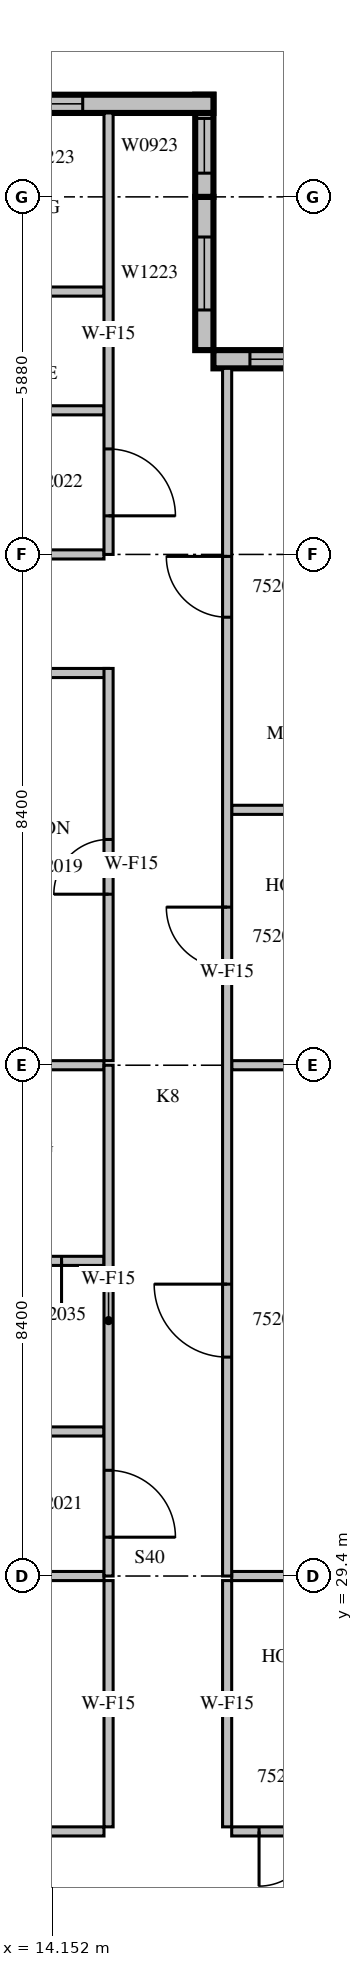
"""IFC4 building model, lengths in metres.
Left out: names, types, materials, properties, quantities, classifications, styles, units other than length and angle.
Written with IfcOpenShell. Run it as: python <this file> out.ifc"""

import sys

from ifc_helpers import new_model, si_unit, direction, frame, frame_2d, origin, place, context, subcontext, project, spatial, rectangle, extrude, source, transform, mapped, element, fill, save


model = new_model("IFC4")
c1 = context("Model", 3, precision=1e-05, world=origin(), true_north=direction((0.0, 1.0)))
c2 = subcontext(c1, "Body", "Model", "MODEL_VIEW")
j1 = project(units=[si_unit("LENGTHUNIT", "METRE"), si_unit("PLANEANGLEUNIT", "RADIAN")], contexts=[c1])
p1 = place(None, origin())
s1 = spatial("IfcSite", under=j1, at=p1, CompositionType="ELEMENT")
p2 = place(p1, origin())
s2 = spatial("IfcBuilding", under=s1, at=p2, CompositionType="ELEMENT")
p3 = place(p2, frame((0.0, 0.0, 231.0)))
s3 = spatial("IfcBuildingStorey", under=s2, at=p3, CompositionType="ELEMENT", Elevation=231.0)
m1 = source(origin(), c2, "Body", "SweptSolid", [
    extrude(rectangle(XDim=4.2, YDim=0.3, at=frame_2d((2.1, 0.0))), origin(), (0.0, 0.0, 1.0), 3.4),
])
p4 = place(p3, frame((21.0, 49.41, 0.0), z_axis=(0.0, 0.0, 1.0), x_axis=(-1.0, 0.0, 0.0)))
e1 = element("IfcWall", 1, at=p4, inside=s3, PredefinedType="STANDARD", context=c2, shape_type="MappedRepresentation", body=[
    mapped(m1, transform((0.0, 0.0, 0.0), scale=1.0)),
])
m2 = source(origin(), c2, "Body", "SweptSolid", [
    extrude(rectangle(XDim=3.0, YDim=2.3, at=frame_2d((1.5, 1.15))), frame((0.0, 0.16, 0.0), z_axis=(0.0, -1.0, 0.0), x_axis=(1.0, 0.0, 0.0)), (0.0, 0.0, 1.0), 0.32),
])
p5 = place(p4, frame((0.6, 0.0, 0.6)))
e2 = element("IfcOpeningElement", 2, at=p5, cuts=e1, PredefinedType="OPENING", context=c2, shape_type="MappedRepresentation", body=[
    mapped(m2, transform((0.0, 0.0, 0.0), scale=1.0)),
])
m3 = source(origin(), c2, "Body", "SweptSolid", [
    extrude(rectangle(XDim=2.52, YDim=0.3, at=frame_2d((1.26, 0.0))), origin(), (0.0, 0.0, 1.0), 3.4),
])
p6 = place(p3, frame((16.65, 49.56, 0.0), z_axis=(0.0, 0.0, 1.0), x_axis=(0.0, 1.0, 0.0)))
e3 = element("IfcWall", 3, at=p6, inside=s3, PredefinedType="STANDARD", context=c2, shape_type="MappedRepresentation", body=[
    mapped(m3, transform((0.0, 0.0, 0.0), scale=1.0)),
])
m4 = source(origin(), c2, "Body", "SweptSolid", [
    extrude(rectangle(XDim=1.2, YDim=2.3, at=frame_2d((0.6, 1.15))), frame((0.0, 0.16, 0.0), z_axis=(0.0, -1.0, 0.0), x_axis=(1.0, 0.0, 0.0)), (0.0, 0.0, 1.0), 0.32),
])
p7 = place(p6, frame((0.66, 0.0, 0.6)))
e4 = element("IfcOpeningElement", 4, at=p7, cuts=e3, PredefinedType="OPENING", context=c2, shape_type="MappedRepresentation", body=[
    mapped(m4, transform((0.0, 0.0, 0.0), scale=1.0)),
])
m5 = source(origin(), c2, "Body", "SweptSolid", [
    extrude(rectangle(XDim=1.68, YDim=0.3, at=frame_2d((0.84, 0.0))), origin(), (0.0, 0.0, 1.0), 3.4),
])
p8 = place(p3, frame((16.65, 52.08, 0.0), z_axis=(0.0, 0.0, 1.0), x_axis=(0.0, 1.0, 0.0)))
e5 = element("IfcWall", 5, at=p8, inside=s3, PredefinedType="STANDARD", context=c2, shape_type="MappedRepresentation", body=[
    mapped(m5, transform((0.0, 0.0, 0.0), scale=1.0)),
])
m6 = source(origin(), c2, "Body", "SweptSolid", [
    extrude(rectangle(XDim=0.9, YDim=2.3, at=frame_2d((0.45, 1.15))), frame((0.0, 0.16, 0.0), z_axis=(0.0, -1.0, 0.0), x_axis=(1.0, 0.0, 0.0)), (0.0, 0.0, 1.0), 0.32),
])
p9 = place(p8, frame((0.39, 0.0, 0.6)))
e6 = element("IfcOpeningElement", 6, at=p9, cuts=e5, PredefinedType="OPENING", context=c2, shape_type="MappedRepresentation", body=[
    mapped(m6, transform((0.0, 0.0, 0.0), scale=1.0)),
])
m7 = source(origin(), c2, "Body", "SweptSolid", [
    extrude(rectangle(XDim=10.5, YDim=0.3, at=frame_2d((5.25, 0.0))), origin(), (0.0, 0.0, 1.0), 3.4),
])
p10 = place(p3, frame((16.8, 53.61, 0.0), z_axis=(0.0, 0.0, 1.0), x_axis=(-1.0, 0.0, 0.0)))
e7 = element("IfcWall", 7, at=p10, inside=s3, PredefinedType="STANDARD", context=c2, shape_type="MappedRepresentation", body=[
    mapped(m7, transform((0.0, 0.0, 0.0), scale=1.0)),
])
p11 = place(p10, frame((2.15, 0.0, 0.6)))
e8 = element("IfcOpeningElement", 8, at=p11, cuts=e7, PredefinedType="OPENING", context=c2, shape_type="MappedRepresentation", body=[
    mapped(m4, transform((0.0, 0.0, 0.0), scale=1.0)),
])
m8 = source(origin(), c2, "Body", "SweptSolid", [
    extrude(rectangle(XDim=1.8, YDim=2.3, at=frame_2d((0.9, 1.15))), frame((0.0, 0.16, 0.0), z_axis=(0.0, -1.0, 0.0), x_axis=(1.0, 0.0, 0.0)), (0.0, 0.0, 1.0), 0.32),
])
p12 = place(p10, frame((8.025, 0.0, 0.6)))
e9 = element("IfcOpeningElement", 9, at=p12, cuts=e7, PredefinedType="OPENING", context=c2, shape_type="MappedRepresentation", body=[
    mapped(m8, transform((0.0, 0.0, 0.0), scale=1.0)),
])
m9 = source(origin(), c2, "Body", "SweptSolid", [
    extrude(rectangle(XDim=4.295, YDim=0.15, at=frame_2d((2.147, 0.0))), origin(), (0.0, 0.0, 1.0), 3.4),
])
p13 = place(p3, frame((10.705, 25.2, 0.0), z_axis=(0.0, 0.0, 1.0), x_axis=(1.0, 0.0, 0.0)))
e10 = element("IfcWall", 10, at=p13, inside=s3, PredefinedType="PARTITIONING", context=c2, shape_type="MappedRepresentation", body=[
    mapped(m9, transform((0.0, 0.0, 0.0), scale=1.0)),
])
m10 = source(origin(), c2, "Body", "SweptSolid", [
    extrude(rectangle(XDim=0.9, YDim=2.1, at=frame_2d((0.45, 1.05))), frame((0.0, 0.085, 0.0), z_axis=(0.0, -1.0, 0.0), x_axis=(1.0, 0.0, 0.0)), (0.0, 0.0, 1.0), 0.17),
])
p14 = place(p13, frame((2.283, 0.0, 0.0)))
e11 = element("IfcOpeningElement", 11, at=p14, cuts=e10, PredefinedType="OPENING", context=c2, shape_type="MappedRepresentation", body=[
    mapped(m10, transform((0.0, 0.0, 0.0), scale=1.0)),
])
m11 = source(origin(), c2, "Body", "SweptSolid", [
    extrude(rectangle(XDim=3.6, YDim=0.15, at=frame_2d((1.8, 0.0))), origin(), (0.0, 0.0, 1.0), 3.4),
])
p15 = place(p3, frame((17.1, 25.2, 0.0), z_axis=(0.0, 0.0, 1.0), x_axis=(1.0, 0.0, 0.0)))
e12 = element("IfcWall", 12, at=p15, inside=s3, PredefinedType="PARTITIONING", context=c2, shape_type="MappedRepresentation", body=[
    mapped(m11, transform((0.0, 0.0, 0.0), scale=1.0)),
])
p16 = place(p15, frame((0.45, 0.0, 0.0)))
e13 = element("IfcOpeningElement", 13, at=p16, cuts=e12, PredefinedType="OPENING", context=c2, shape_type="MappedRepresentation", body=[
    mapped(m10, transform((0.0, 0.0, 0.0), scale=1.0)),
])
m12 = source(origin(), c2, "Body", "SweptSolid", [
    extrude(rectangle(XDim=4.05, YDim=0.15, at=frame_2d((2.025, 0.0))), origin(), (0.0, 0.0, 1.0), 3.4),
])
for number, where, z_axis, x_axis in (
    (14, (15.075, 25.275, 0.0), (0.0, 0.0, 1.0), (0.0, 1.0, 0.0)),
    (15, (17.025, 29.325, 0.0), (0.0, 0.0, 1.0), (0.0, -1.0, 0.0)),
):
    element("IfcWall", number, at=place(p3, frame(where, z_axis=z_axis, x_axis=x_axis)), inside=s3, PredefinedType="PARTITIONING", context=c2, shape_type="MappedRepresentation", body=[
        mapped(m12, transform((0.0, 0.0, 0.0), scale=1.0)),
    ])
m13 = source(origin(), c2, "Body", "SweptSolid", [
    extrude(rectangle(XDim=4.101, YDim=0.15, at=frame_2d((2.05, 0.0))), origin(), (0.0, 0.0, 1.0), 3.4),
])
p17 = place(p3, frame((15.0, 29.4, 0.0), z_axis=(0.0, 0.0, 1.0), x_axis=(-1.0, 0.0, 0.0)))
e16 = element("IfcWall", 16, at=p17, inside=s3, PredefinedType="PARTITIONING", context=c2, shape_type="MappedRepresentation", body=[
    mapped(m13, transform((0.0, 0.0, 0.0), scale=1.0)),
])
m14 = source(origin(), c2, "Body", "SweptSolid", [
    extrude(rectangle(XDim=3.101, YDim=0.15, at=frame_2d((1.55, 0.0))), origin(), (0.0, 0.0, 1.0), 3.4),
])
p18 = place(p3, frame((20.201, 29.4, 0.0), z_axis=(0.0, 0.0, 1.0), x_axis=(-1.0, 0.0, 0.0)))
e17 = element("IfcWall", 17, at=p18, inside=s3, PredefinedType="PARTITIONING", context=c2, shape_type="MappedRepresentation", body=[
    mapped(m14, transform((0.0, 0.0, 0.0), scale=1.0)),
])
m15 = source(origin(), c2, "Body", "SweptSolid", [
    extrude(rectangle(XDim=3.975, YDim=0.15, at=frame_2d((1.988, 0.0))), origin(), (0.0, 0.0, 1.0), 3.4),
])
p19 = place(p3, frame((15.075, 44.25, 0.0), z_axis=(0.0, 0.0, 1.0), x_axis=(-1.0, 0.0, 0.0)))
e18 = element("IfcWall", 18, at=p19, inside=s3, PredefinedType="PARTITIONING", context=c2, shape_type="MappedRepresentation", body=[
    mapped(m15, transform((0.0, 0.0, 0.0), scale=1.0)),
])
m16 = source(origin(), c2, "Body", "SweptSolid", [
    extrude(rectangle(XDim=6.45, YDim=0.15, at=frame_2d((3.225, 0.0))), origin(), (0.0, 0.0, 1.0), 3.4),
])
p20 = place(p3, frame((15.075, 37.875, 0.0), z_axis=(0.0, 0.0, 1.0), x_axis=(0.0, 1.0, 0.0)))
e19 = element("IfcWall", 19, at=p20, inside=s3, PredefinedType="PARTITIONING", context=c2, shape_type="MappedRepresentation", body=[
    mapped(m16, transform((0.0, 0.0, 0.0), scale=1.0)),
])
p21 = place(p20, frame((2.737, 0.0, 0.0)))
e20 = element("IfcOpeningElement", 20, at=p21, cuts=e19, PredefinedType="OPENING", context=c2, shape_type="MappedRepresentation", body=[
    mapped(m10, transform((0.0, 0.0, 0.0), scale=1.0)),
])
p22 = place(p3, frame((15.0, 31.777, 0.0), z_axis=(0.0, 0.0, 1.0), x_axis=(-1.0, 0.0, 0.0)))
e21 = element("IfcWall", 21, at=p22, inside=s3, PredefinedType="PARTITIONING", context=c2, shape_type="MappedRepresentation", body=[
    mapped(m9, transform((0.0, 0.0, 0.0), scale=1.0)),
])
p23 = place(p22, frame((1.698, 0.0, 0.0)))
e22 = element("IfcOpeningElement", 22, at=p23, cuts=e21, PredefinedType="OPENING", context=c2, shape_type="MappedRepresentation", body=[
    mapped(m10, transform((0.0, 0.0, 0.0), scale=1.0)),
])
p24 = place(p3, frame((15.0, 34.583, 0.0), z_axis=(0.0, 0.0, 1.0), x_axis=(-1.0, 0.0, 0.0)))
e23 = element("IfcWall", 23, at=p24, inside=s3, PredefinedType="PARTITIONING", context=c2, shape_type="MappedRepresentation", body=[
    mapped(m9, transform((0.0, 0.0, 0.0), scale=1.0)),
])
p25 = place(p24, frame((1.698, 0.0, 0.0)))
e24 = element("IfcOpeningElement", 24, at=p25, cuts=e23, PredefinedType="OPENING", context=c2, shape_type="MappedRepresentation", body=[
    mapped(m10, transform((0.0, 0.0, 0.0), scale=1.0)),
])
p26 = place(p24, frame((0.698, 0.0, 0.0)))
e25 = element("IfcOpeningElement", 25, at=p26, cuts=e23, PredefinedType="OPENING", context=c2, shape_type="MappedRepresentation", body=[
    mapped(m10, transform((0.0, 0.0, 0.0), scale=1.0)),
])
p27 = place(p24, frame((2.698, 0.0, 0.0)))
e26 = element("IfcOpeningElement", 26, at=p27, cuts=e23, PredefinedType="OPENING", context=c2, shape_type="MappedRepresentation", body=[
    mapped(m10, transform((0.0, 0.0, 0.0), scale=1.0)),
])
p28 = place(p3, frame((15.0, 37.8, 0.0), z_axis=(0.0, 0.0, 1.0), x_axis=(-1.0, 0.0, 0.0)))
e27 = element("IfcWall", 27, at=p28, inside=s3, PredefinedType="PARTITIONING", context=c2, shape_type="MappedRepresentation", body=[
    mapped(m13, transform((0.0, 0.0, 0.0), scale=1.0)),
])
m17 = source(origin(), c2, "Body", "SweptSolid", [
    extrude(rectangle(XDim=3.95, YDim=0.15, at=frame_2d((1.975, 0.0))), origin(), (0.0, 0.0, 1.0), 3.4),
])
for number, where, z_axis, x_axis in (
    (28, (15.0, 48.57, 0.0), (0.0, 0.0, 1.0), (-1.0, 0.0, 0.0)),
    (29, (15.0, 50.523, 0.0), (0.0, 0.0, 1.0), (-1.0, 0.0, 0.0)),
    (30, (15.0, 46.2, 0.0), (0.0, 0.0, 1.0), (-1.0, 0.0, 0.0)),
):
    element("IfcWall", number, at=place(p3, frame(where, z_axis=z_axis, x_axis=x_axis)), inside=s3, PredefinedType="PARTITIONING", context=c2, shape_type="MappedRepresentation", body=[
        mapped(m17, transform((0.0, 0.0, 0.0), scale=1.0)),
    ])
p29 = place(p3, frame((20.201, 37.8, 0.0), z_axis=(0.0, 0.0, 1.0), x_axis=(-1.0, 0.0, 0.0)))
e31 = element("IfcWall", 31, at=p29, inside=s3, PredefinedType="PARTITIONING", context=c2, shape_type="MappedRepresentation", body=[
    mapped(m14, transform((0.0, 0.0, 0.0), scale=1.0)),
])
p30 = place(p3, frame((20.7, 42.0, 0.0), z_axis=(0.0, 0.0, 1.0), x_axis=(-1.0, 0.0, 0.0)))
e32 = element("IfcWall", 32, at=p30, inside=s3, PredefinedType="PARTITIONING", context=c2, shape_type="MappedRepresentation", body=[
    mapped(m11, transform((0.0, 0.0, 0.0), scale=1.0)),
])
m18 = source(origin(), c2, "Body", "SweptSolid", [
    extrude(rectangle(XDim=8.4, YDim=0.15, at=frame_2d((4.2, 0.0))), origin(), (0.0, 0.0, 1.0), 3.4),
])
p31 = place(p3, frame((15.075, 29.4, 0.0), z_axis=(0.0, 0.0, 1.0), x_axis=(0.0, 1.0, 0.0)))
e33 = element("IfcWall", 33, at=p31, inside=s3, PredefinedType="PARTITIONING", context=c2, shape_type="MappedRepresentation", body=[
    mapped(m18, transform((0.0, 0.0, 0.0), scale=1.0)),
])
m19 = source(origin(), c2, "Body", "SweptSolid", [
    extrude(rectangle(XDim=1.1, YDim=2.1, at=frame_2d((0.55, 1.05))), frame((0.0, 0.085, 0.0), z_axis=(0.0, -1.0, 0.0), x_axis=(1.0, 0.0, 0.0)), (0.0, 0.0, 1.0), 0.17),
])
p32 = place(p31, frame((0.638, 0.0, 0.0)))
e34 = element("IfcOpeningElement", 34, at=p32, cuts=e33, PredefinedType="OPENING", context=c2, shape_type="MappedRepresentation", body=[
    mapped(m19, transform((0.0, 0.0, 0.0), scale=1.0)),
])
m20 = source(origin(), c2, "Body", "SweptSolid", [
    extrude(rectangle(XDim=7.26, YDim=0.15, at=frame_2d((3.63, 0.0))), origin(), (0.0, 0.0, 1.0), 3.4),
])
p33 = place(p3, frame((15.075, 46.2, 0.0), z_axis=(0.0, 0.0, 1.0), x_axis=(0.0, 1.0, 0.0)))
e35 = element("IfcWall", 35, at=p33, inside=s3, PredefinedType="PARTITIONING", context=c2, shape_type="MappedRepresentation", body=[
    mapped(m20, transform((0.0, 0.0, 0.0), scale=1.0)),
])
p34 = place(p33, frame((0.635, 0.0, 0.0)))
e36 = element("IfcOpeningElement", 36, at=p34, cuts=e35, PredefinedType="OPENING", context=c2, shape_type="MappedRepresentation", body=[
    mapped(m19, transform((0.0, 0.0, 0.0), scale=1.0)),
])
m21 = source(origin(), c2, "Body", "SweptSolid", [
    extrude(rectangle(XDim=19.86, YDim=0.15, at=frame_2d((9.93, 0.0))), origin(), (0.0, 0.0, 1.0), 3.4),
])
p35 = place(p3, frame((17.025, 49.26, 0.0), z_axis=(0.0, 0.0, 1.0), x_axis=(0.0, -1.0, 0.0)))
e37 = element("IfcWall", 37, at=p35, inside=s3, PredefinedType="PARTITIONING", context=c2, shape_type="MappedRepresentation", body=[
    mapped(m21, transform((0.0, 0.0, 0.0), scale=1.0)),
])
m22 = source(origin(), c2, "Body", "SweptSolid", [
    extrude(rectangle(XDim=1.2, YDim=2.1, at=frame_2d((0.6, 1.05))), frame((0.0, 0.085, 0.0), z_axis=(0.0, -1.0, 0.0), x_axis=(1.0, 0.0, 0.0)), (0.0, 0.0, 1.0), 0.17),
])
p36 = place(p35, frame((15.06, 0.0, 0.0)))
e38 = element("IfcOpeningElement", 38, at=p36, cuts=e37, PredefinedType="OPENING", context=c2, shape_type="MappedRepresentation", body=[
    mapped(m22, transform((0.0, 0.0, 0.0), scale=1.0)),
])
m23 = source(origin(), c2, "Body", "SweptSolid", [
    extrude(rectangle(XDim=1.0, YDim=2.1, at=frame_2d((0.5, 1.05))), frame((0.0, 0.085, 0.0), z_axis=(0.0, -1.0, 0.0), x_axis=(1.0, 0.0, 0.0)), (0.0, 0.0, 1.0), 0.17),
])
p37 = place(p35, frame((8.86, 0.0, 0.0)))
e39 = element("IfcOpeningElement", 39, at=p37, cuts=e37, PredefinedType="OPENING", context=c2, shape_type="MappedRepresentation", body=[
    mapped(m23, transform((0.0, 0.0, 0.0), scale=1.0)),
])
p38 = place(p35, frame((3.092, 0.0, 0.0)))
e40 = element("IfcOpeningElement", 40, at=p38, cuts=e37, PredefinedType="OPENING", context=c2, shape_type="MappedRepresentation", body=[
    mapped(m23, transform((0.0, 0.0, 0.0), scale=1.0)),
])
m24 = source(origin(), c2, "Body", "SweptSolid", [
    extrude(rectangle(XDim=3.0, YDim=2.3, at=frame_2d((1.5, 1.15))), frame((0.0, 0.03, 0.0), z_axis=(0.0, -1.0, 0.0), x_axis=(1.0, 0.0, 0.0)), (0.0, 0.0, 1.0), 0.06),
])
p39 = place(p5, origin())
e41 = element("IfcWindow", 41, at=p39, inside=s3, PartitioningType="SINGLE_PANEL", PredefinedType="WINDOW", context=c2, shape_type="MappedRepresentation", body=[
    mapped(m24, transform((0.0, 0.0, 0.0), scale=1.0)),
])
fill(e2, e41)
m25 = source(origin(), c2, "Body", "SweptSolid", [
    extrude(rectangle(XDim=1.2, YDim=2.3, at=frame_2d((0.6, 1.15))), frame((0.0, 0.03, 0.0), z_axis=(0.0, -1.0, 0.0), x_axis=(1.0, 0.0, 0.0)), (0.0, 0.0, 1.0), 0.06),
])
p40 = place(p7, origin())
e42 = element("IfcWindow", 42, at=p40, inside=s3, PartitioningType="SINGLE_PANEL", PredefinedType="WINDOW", context=c2, shape_type="MappedRepresentation", body=[
    mapped(m25, transform((0.0, 0.0, 0.0), scale=1.0)),
])
fill(e4, e42)
m26 = source(origin(), c2, "Body", "SweptSolid", [
    extrude(rectangle(XDim=0.9, YDim=2.3, at=frame_2d((0.45, 1.15))), frame((0.0, 0.03, 0.0), z_axis=(0.0, -1.0, 0.0), x_axis=(1.0, 0.0, 0.0)), (0.0, 0.0, 1.0), 0.06),
])
p41 = place(p9, origin())
e43 = element("IfcWindow", 43, at=p41, inside=s3, PartitioningType="SINGLE_PANEL", PredefinedType="WINDOW", context=c2, shape_type="MappedRepresentation", body=[
    mapped(m26, transform((0.0, 0.0, 0.0), scale=1.0)),
])
fill(e6, e43)
p42 = place(p11, origin())
e44 = element("IfcWindow", 44, at=p42, inside=s3, PartitioningType="SINGLE_PANEL", PredefinedType="WINDOW", context=c2, shape_type="MappedRepresentation", body=[
    mapped(m25, transform((0.0, 0.0, 0.0), scale=1.0)),
])
fill(e8, e44)
m27 = source(origin(), c2, "Body", "SweptSolid", [
    extrude(rectangle(XDim=0.9, YDim=2.1, at=frame_2d((0.45, 1.05))), frame((0.0, 0.025, 0.0), z_axis=(0.0, -1.0, 0.0), x_axis=(1.0, 0.0, 0.0)), (0.0, 0.0, 1.0), 0.05),
])
p43 = place(p16, origin())
e45 = element("IfcDoor", 45, at=p43, inside=s3, OperationType="SINGLE_SWING_RIGHT", PredefinedType="DOOR", context=c2, shape_type="MappedRepresentation", body=[
    mapped(m27, transform((0.0, 0.0, 0.0), scale=1.0)),
])
fill(e13, e45)
p44 = place(p21, origin())
e46 = element("IfcDoor", 46, at=p44, inside=s3, OperationType="SINGLE_SWING_LEFT", PredefinedType="DOOR", context=c2, shape_type="MappedRepresentation", body=[
    mapped(m27, transform((0.0, 0.0, 0.0), scale=1.0)),
])
fill(e20, e46)
m28 = source(origin(), c2, "Body", "SweptSolid", [
    extrude(rectangle(XDim=1.1, YDim=2.1, at=frame_2d((0.55, 1.05))), frame((0.0, 0.025, 0.0), z_axis=(0.0, -1.0, 0.0), x_axis=(1.0, 0.0, 0.0)), (0.0, 0.0, 1.0), 0.05),
])
p45 = place(p32, origin())
e47 = element("IfcDoor", 47, at=p45, inside=s3, OperationType="SINGLE_SWING_RIGHT", PredefinedType="DOOR", context=c2, shape_type="MappedRepresentation", body=[
    mapped(m28, transform((0.0, 0.0, 0.0), scale=1.0)),
])
fill(e34, e47)
p46 = place(p34, origin())
e48 = element("IfcDoor", 48, at=p46, inside=s3, OperationType="SINGLE_SWING_RIGHT", PredefinedType="DOOR", context=c2, shape_type="MappedRepresentation", body=[
    mapped(m28, transform((0.0, 0.0, 0.0), scale=1.0)),
])
fill(e36, e48)
m29 = source(origin(), c2, "Body", "SweptSolid", [
    extrude(rectangle(XDim=1.2, YDim=2.1, at=frame_2d((0.6, 1.05))), frame((0.0, 0.025, 0.0), z_axis=(0.0, -1.0, 0.0), x_axis=(1.0, 0.0, 0.0)), (0.0, 0.0, 1.0), 0.05),
])
p47 = place(p36, origin())
e49 = element("IfcDoor", 49, at=p47, inside=s3, OperationType="SINGLE_SWING_RIGHT", PredefinedType="DOOR", context=c2, shape_type="MappedRepresentation", body=[
    mapped(m29, transform((0.0, 0.0, 0.0), scale=1.0)),
])
fill(e38, e49)
m30 = source(origin(), c2, "Body", "SweptSolid", [
    extrude(rectangle(XDim=1.0, YDim=2.1, at=frame_2d((0.5, 1.05))), frame((0.0, 0.025, 0.0), z_axis=(0.0, -1.0, 0.0), x_axis=(1.0, 0.0, 0.0)), (0.0, 0.0, 1.0), 0.05),
])
p48 = place(p37, origin())
e50 = element("IfcDoor", 50, at=p48, inside=s3, OperationType="SINGLE_SWING_RIGHT", PredefinedType="DOOR", context=c2, shape_type="MappedRepresentation", body=[
    mapped(m30, transform((0.0, 0.0, 0.0), scale=1.0)),
])
fill(e39, e50)
p49 = place(p38, origin())
e51 = element("IfcDoor", 51, at=p49, inside=s3, OperationType="SINGLE_SWING_RIGHT", PredefinedType="DOOR", context=c2, shape_type="MappedRepresentation", body=[
    mapped(m30, transform((0.0, 0.0, 0.0), scale=1.0)),
])
fill(e40, e51)
p50 = place(p26, origin())
e52 = element("IfcDoor", 52, at=p50, inside=s3, OperationType="SINGLE_SWING_LEFT", PredefinedType="DOOR", context=c2, shape_type="MappedRepresentation", body=[
    mapped(m27, transform((0.0, 0.0, 0.0), scale=1.0)),
])
fill(e25, e52)
save(model, sys.argv[1])
